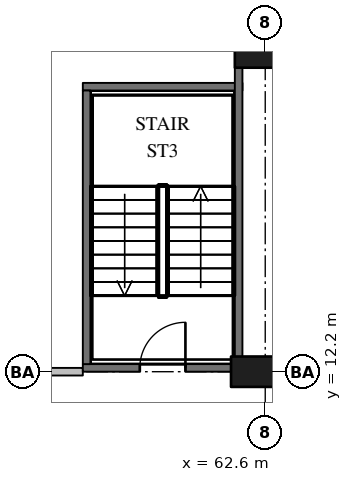
"""IFC4 building model, lengths in metres.
Left out: names, types, materials, properties, quantities, classifications, styles, units other than length and angle.
Written with IfcOpenShell. Run it as: python <this file> out.ifc"""

import sys

from ifc_helpers import new_model, si_unit, direction, frame, frame_2d, origin, origin_2d, place, context, subcontext, project, spatial, rectangle, extrude, element, fill, save


model = new_model("IFC4")
c1 = context("Model", 3, precision=1e-05, world=origin(), true_north=direction((0.0, 1.0)))
c2 = subcontext(c1, "Body", "Model", "MODEL_VIEW")
j1 = project(units=[si_unit("LENGTHUNIT", "METRE"), si_unit("PLANEANGLEUNIT", "RADIAN")], contexts=[c1])
p1 = place(None, origin())
s1 = spatial("IfcSite", under=j1, at=p1, CompositionType="ELEMENT")
p2 = place(p1, origin())
s2 = spatial("IfcBuilding", under=s1, at=p2, CompositionType="ELEMENT")
p3 = place(p2, frame((0.0, 0.0, 29.0)))
s3 = spatial("IfcBuildingStorey", under=s2, at=p3, CompositionType="ELEMENT", Elevation=29.0)
p4 = place(p3, frame((62.6, 12.2, 0.0), z_axis=(0.0, 0.0, 1.0), x_axis=(1.0, 0.0, 0.0)))
e1 = element("IfcColumn", 1, at=p4, inside=s3, PredefinedType="COLUMN", context=c2, shape_type="SweptSolid", body=[
    extrude(rectangle(XDim=1.8, YDim=0.8, at=origin_2d()), origin(), (0.0, 0.0, 1.0), 5.0),
])
p5 = place(p3, frame((62.6, 21.0, 0.0), z_axis=(0.0, 0.0, 1.0), x_axis=(1.0, 0.0, 0.0)))
e2 = element("IfcColumn", 2, at=p5, inside=s3, PredefinedType="COLUMN", context=c2, shape_type="SweptSolid", body=[
    extrude(rectangle(XDim=1.6, YDim=1.6, at=origin_2d()), origin(), (0.0, 0.0, 1.0), 5.0),
])
p6 = place(p3, frame((57.8, 12.3, 0.0), z_axis=(0.0, 0.0, 1.0), x_axis=(1.0, 0.0, 0.0)))
e3 = element("IfcWall", 3, at=p6, inside=s3, PredefinedType="SHEAR", context=c2, shape_type="SweptSolid", body=[
    extrude(rectangle(XDim=4.2, YDim=0.2, at=frame_2d((2.1, 0.0))), origin(), (0.0, 0.0, 1.0), 4.6),
])
p7 = place(p6, frame((1.5, 0.0, 0.0)))
e4 = element("IfcOpeningElement", 4, at=p7, cuts=e3, PredefinedType="OPENING", context=c2, shape_type="SweptSolid", body=[
    extrude(rectangle(XDim=1.2, YDim=2.1, at=frame_2d((0.6, 1.05))), frame((0.0, 0.11, 0.0), z_axis=(0.0, -1.0, 0.0), x_axis=(1.0, 0.0, 0.0)), (0.0, 0.0, 1.0), 0.22),
])
p8 = place(p3, frame((57.8, 19.7, 0.0), z_axis=(0.0, 0.0, 1.0), x_axis=(1.0, 0.0, 0.0)))
e5 = element("IfcWall", 5, at=p8, inside=s3, PredefinedType="SHEAR", context=c2, shape_type="SweptSolid", body=[
    extrude(rectangle(XDim=4.2, YDim=0.2, at=frame_2d((2.1, 0.0))), origin(), (0.0, 0.0, 1.0), 4.6),
])
p9 = place(p3, frame((57.9, 12.4, 0.0), z_axis=(0.0, 0.0, 1.0), x_axis=(0.0, 1.0, 0.0)))
e6 = element("IfcWall", 6, at=p9, inside=s3, PredefinedType="SHEAR", context=c2, shape_type="SweptSolid", body=[
    extrude(rectangle(XDim=7.2, YDim=0.2, at=frame_2d((3.6, 0.0))), origin(), (0.0, 0.0, 1.0), 4.6),
])
p10 = place(p3, frame((61.9, 12.4, 0.0), z_axis=(0.0, 0.0, 1.0), x_axis=(0.0, 1.0, 0.0)))
e7 = element("IfcWall", 7, at=p10, inside=s3, PredefinedType="SHEAR", context=c2, shape_type="SweptSolid", body=[
    extrude(rectangle(XDim=7.8, YDim=0.2, at=frame_2d((3.9, 0.0))), origin(), (0.0, 0.0, 1.0), 4.6),
])
p11 = place(p3, frame((35.4, 12.2, 0.0), z_axis=(0.0, 0.0, 1.0), x_axis=(1.0, 0.0, 0.0)))
e8 = element("IfcWall", 8, at=p11, inside=s3, PredefinedType="PARTITIONING", context=c2, shape_type="SweptSolid", body=[
    extrude(rectangle(XDim=22.4, YDim=0.2, at=frame_2d((11.2, 0.0))), origin(), (0.0, 0.0, 1.0), 4.55),
])
p12 = place(p11, frame((3.64, 0.0, 0.0)))
e9 = element("IfcOpeningElement", 9, at=p12, cuts=e8, PredefinedType="OPENING", context=c2, shape_type="SweptSolid", body=[
    extrude(rectangle(XDim=1.8, YDim=2.4, at=frame_2d((0.9, 1.2))), frame((0.0, 0.11, 0.0), z_axis=(0.0, -1.0, 0.0), x_axis=(1.0, 0.0, 0.0)), (0.0, 0.0, 1.0), 0.22),
])
p13 = place(p11, frame((12.44, 0.0, 0.0)))
e10 = element("IfcOpeningElement", 10, at=p13, cuts=e8, PredefinedType="OPENING", context=c2, shape_type="SweptSolid", body=[
    extrude(rectangle(XDim=1.8, YDim=2.4, at=frame_2d((0.9, 1.2))), frame((0.0, 0.11, 0.0), z_axis=(0.0, -1.0, 0.0), x_axis=(1.0, 0.0, 0.0)), (0.0, 0.0, 1.0), 0.22),
])
p14 = place(p3, frame((62.0, 12.2, 0.0), z_axis=(0.0, 0.0, 1.0), x_axis=(1.0, 0.0, 0.0)))
e11 = element("IfcWall", 11, at=p14, inside=s3, PredefinedType="PARTITIONING", context=c2, shape_type="SweptSolid", body=[
    extrude(rectangle(XDim=4.6, YDim=0.2, at=frame_2d((2.3, 0.0))), origin(), (0.0, 0.0, 1.0), 4.55),
])
p15 = place(p7, origin())
e12 = element("IfcDoor", 12, at=p15, inside=s3, OperationType="SINGLE_SWING_RIGHT", PredefinedType="DOOR", context=c2, shape_type="SweptSolid", body=[
    extrude(rectangle(XDim=1.2, YDim=2.1, at=frame_2d((0.6, 1.05))), frame((0.0, 0.025, 0.0), z_axis=(0.0, -1.0, 0.0), x_axis=(1.0, 0.0, 0.0)), (0.0, 0.0, 1.0), 0.05),
])
fill(e4, e12)
save(model, sys.argv[1])
